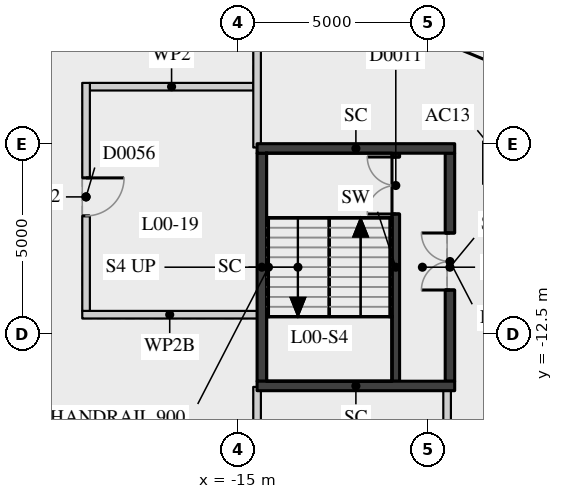
"""IFC4 building model, lengths in metres.
Left out: names, types, materials, properties, quantities, classifications, styles, units other than length and angle.
Written with IfcOpenShell. Run it as: python <this file> out.ifc"""

import sys

from ifc_helpers import new_model, si_unit, direction, frame, frame_2d, origin, place, context, subcontext, project, spatial, rectangle, extrude, element, fill, save


model = new_model("IFC4")
c1 = context("Model", 3, precision=1e-05, world=origin(), true_north=direction((0.0, 1.0)))
c2 = subcontext(c1, "Body", "Model", "MODEL_VIEW")
j1 = project(units=[si_unit("LENGTHUNIT", "METRE"), si_unit("PLANEANGLEUNIT", "RADIAN")], contexts=[c1])
p1 = place(None, origin())
s1 = spatial("IfcSite", under=j1, at=p1, CompositionType="ELEMENT")
p2 = place(p1, origin())
s2 = spatial("IfcBuilding", under=s1, at=p2, CompositionType="ELEMENT")
p3 = place(p2, origin())
s3 = spatial("IfcBuildingStorey", under=s2, at=p3, CompositionType="ELEMENT", Elevation=0.0)
p4 = place(p3, frame((-10.85, -13.75, 0.0), z_axis=(0.0, 0.0, 1.0), x_axis=(0.0, 1.0, 0.0)))
e1 = element("IfcWall", 1, at=p4, inside=s3, PredefinedType="SHEAR", context=c2, shape_type="SweptSolid", body=[
    extrude(rectangle(XDim=6.0, YDim=0.2, at=frame_2d((3.0, 0.0))), origin(), (0.0, 0.0, 1.0), 7.09),
])
p5 = place(p4, frame((4.4, 0.0, 0.0)))
e2 = element("IfcOpeningElement", 2, at=p5, cuts=e1, PredefinedType="OPENING", context=c2, shape_type="SweptSolid", body=[
    extrude(rectangle(XDim=1.5, YDim=2.1, at=frame_2d((0.75, 1.05))), frame((0.0, 0.11, 0.0), z_axis=(0.0, -1.0, 0.0), x_axis=(1.0, 0.0, 0.0)), (0.0, 0.0, 1.0), 0.22),
])
p6 = place(p3, frame((-14.375, -13.75, 0.0), z_axis=(0.0, 0.0, 1.0), x_axis=(0.0, 1.0, 0.0)))
e3 = element("IfcWall", 3, at=p6, inside=s3, PredefinedType="SHEAR", context=c2, shape_type="SweptSolid", body=[
    extrude(rectangle(XDim=6.0, YDim=0.25, at=frame_2d((3.0, 0.0))), origin(), (0.0, 0.0, 1.0), 7.09),
])
p7 = place(p3, frame((-9.425, -13.75, 0.0), z_axis=(0.0, 0.0, 1.0), x_axis=(0.0, 1.0, 0.0)))
e4 = element("IfcWall", 4, at=p7, inside=s3, PredefinedType="SHEAR", context=c2, shape_type="SweptSolid", body=[
    extrude(rectangle(XDim=6.0, YDim=0.25, at=frame_2d((3.0, 0.0))), origin(), (0.0, 0.0, 1.0), 7.09),
])
p8 = place(p7, frame((2.4, 0.0, 0.0)))
e5 = element("IfcOpeningElement", 5, at=p8, cuts=e4, PredefinedType="OPENING", context=c2, shape_type="SweptSolid", body=[
    extrude(rectangle(XDim=1.5, YDim=2.1, at=frame_2d((0.75, 1.05))), frame((0.0, 0.135, 0.0), z_axis=(0.0, -1.0, 0.0), x_axis=(1.0, 0.0, 0.0)), (0.0, 0.0, 1.0), 0.27),
])
for number, where, z_axis, x_axis in (
    (6, (-14.5, -7.625, 0.0), (0.0, 0.0, 1.0), (1.0, 0.0, 0.0)),
    (7, (-14.5, -13.875, 0.0), (0.0, 0.0, 1.0), (1.0, 0.0, 0.0)),
):
    element("IfcWall", number, at=place(p3, frame(where, z_axis=z_axis, x_axis=x_axis)), inside=s3, PredefinedType="SHEAR", context=c2, shape_type="SweptSolid", body=[
        extrude(rectangle(XDim=5.2, YDim=0.25, at=frame_2d((2.6, 0.0))), origin(), (0.0, 0.0, 1.0), 7.09),
    ])
p9 = place(p3, frame((-19.1, -12.0, 0.0), z_axis=(0.0, 0.0, 1.0), x_axis=(1.0, 0.0, 0.0)))
e8 = element("IfcWall", 8, at=p9, inside=s3, PredefinedType="PARTITIONING", context=c2, shape_type="SweptSolid", body=[
    extrude(rectangle(XDim=4.602, YDim=0.2, at=frame_2d((2.301, 0.0))), origin(), (0.0, 0.0, 1.0), 6.54),
])
p10 = place(p3, frame((-18.9, -6.0, 0.0), z_axis=(0.0, 0.0, 1.0), x_axis=(1.0, 0.0, 0.0)))
e9 = element("IfcWall", 9, at=p10, inside=s3, PredefinedType="PARTITIONING", context=c2, shape_type="SweptSolid", body=[
    extrude(rectangle(XDim=4.3, YDim=0.2, at=frame_2d((2.15, 0.0))), origin(), (0.0, 0.0, 1.0), 7.09),
])
p11 = place(p3, frame((-19.0, -11.9, 0.0), z_axis=(0.0, 0.0, 1.0), x_axis=(0.0, 1.0, 0.0)))
e10 = element("IfcWall", 10, at=p11, inside=s3, PredefinedType="PARTITIONING", context=c2, shape_type="SweptSolid", body=[
    extrude(rectangle(XDim=6.0, YDim=0.2, at=frame_2d((3.0, 0.0))), origin(), (0.0, 0.0, 1.0), 7.09),
])
p12 = place(p11, frame((2.5, 0.0, 0.0)))
e11 = element("IfcOpeningElement", 11, at=p12, cuts=e10, PredefinedType="OPENING", context=c2, shape_type="SweptSolid", body=[
    extrude(rectangle(XDim=1.0, YDim=2.1, at=frame_2d((0.5, 1.05))), frame((0.0, 0.11, 0.0), z_axis=(0.0, -1.0, 0.0), x_axis=(1.0, 0.0, 0.0)), (0.0, 0.0, 1.0), 0.22),
])
p13 = place(p3, frame((-14.5, -31.803, 0.0), z_axis=(0.0, 0.0, 1.0), x_axis=(0.0, 1.0, 0.0)))
e12 = element("IfcWall", 12, at=p13, inside=s3, PredefinedType="PARTITIONING", context=c2, shape_type="SweptSolid", body=[
    extrude(rectangle(XDim=17.903, YDim=0.2, at=frame_2d((8.952, 0.0))), origin(), (0.0, 0.0, 1.0), 6.64),
])
p14 = place(p3, frame((-14.5, -7.6, 0.0), z_axis=(0.0, 0.0, 1.0), x_axis=(0.0, 1.0, 0.0)))
e13 = element("IfcWall", 13, at=p14, inside=s3, PredefinedType="PARTITIONING", context=c2, shape_type="SweptSolid", body=[
    extrude(rectangle(XDim=13.7, YDim=0.2, at=frame_2d((6.85, 0.0))), origin(), (0.0, 0.0, 1.0), 7.09),
])
p15 = place(p14, frame((5.2, 0.0, 0.0)))
e14 = element("IfcOpeningElement", 14, at=p15, cuts=e13, PredefinedType="OPENING", context=c2, shape_type="SweptSolid", body=[
    extrude(rectangle(XDim=1.8, YDim=2.4, at=frame_2d((0.9, 1.2))), frame((0.0, 0.11, 0.0), z_axis=(0.0, -1.0, 0.0), x_axis=(1.0, 0.0, 0.0)), (0.0, 0.0, 1.0), 0.22),
])
p16 = place(p3, frame((-9.5, -18.9, 0.0), z_axis=(0.0, 0.0, 1.0), x_axis=(0.0, 1.0, 0.0)))
e15 = element("IfcWall", 15, at=p16, inside=s3, PredefinedType="PARTITIONING", context=c2, shape_type="SweptSolid", body=[
    extrude(rectangle(XDim=5.0, YDim=0.2, at=frame_2d((2.5, 0.0))), origin(), (0.0, 0.0, 1.0), 6.54),
])
p17 = place(p16, frame((2.0, 0.0, 0.0)))
e16 = element("IfcOpeningElement", 16, at=p17, cuts=e15, PredefinedType="OPENING", context=c2, shape_type="SweptSolid", body=[
    extrude(rectangle(XDim=1.0, YDim=2.1, at=frame_2d((0.5, 1.05))), frame((0.0, 0.11, 0.0), z_axis=(0.0, -1.0, 0.0), x_axis=(1.0, 0.0, 0.0)), (0.0, 0.0, 1.0), 0.22),
])
p18 = place(p5, origin())
e17 = element("IfcDoor", 17, at=p18, inside=s3, OperationType="DOUBLE_DOOR_SINGLE_SWING", PredefinedType="DOOR", context=c2, shape_type="SweptSolid", body=[
    extrude(rectangle(XDim=1.5, YDim=2.1, at=frame_2d((0.75, 1.05))), frame((0.0, 0.025, 0.0), z_axis=(0.0, -1.0, 0.0), x_axis=(1.0, 0.0, 0.0)), (0.0, 0.0, 1.0), 0.05),
])
fill(e2, e17)
p19 = place(p8, origin())
e18 = element("IfcDoor", 18, at=p19, inside=s3, OperationType="DOUBLE_DOOR_SINGLE_SWING", PredefinedType="DOOR", context=c2, shape_type="SweptSolid", body=[
    extrude(rectangle(XDim=1.5, YDim=2.1, at=frame_2d((0.75, 1.05))), frame((0.0, 0.025, 0.0), z_axis=(0.0, -1.0, 0.0), x_axis=(1.0, 0.0, 0.0)), (0.0, 0.0, 1.0), 0.05),
])
fill(e5, e18)
p20 = place(p12, origin())
e19 = element("IfcDoor", 19, at=p20, inside=s3, OperationType="SINGLE_SWING_LEFT", PredefinedType="DOOR", context=c2, shape_type="SweptSolid", body=[
    extrude(rectangle(XDim=1.0, YDim=2.1, at=frame_2d((0.5, 1.05))), frame((0.0, 0.025, 0.0), z_axis=(0.0, -1.0, 0.0), x_axis=(1.0, 0.0, 0.0)), (0.0, 0.0, 1.0), 0.05),
])
fill(e11, e19)
save(model, sys.argv[1])
